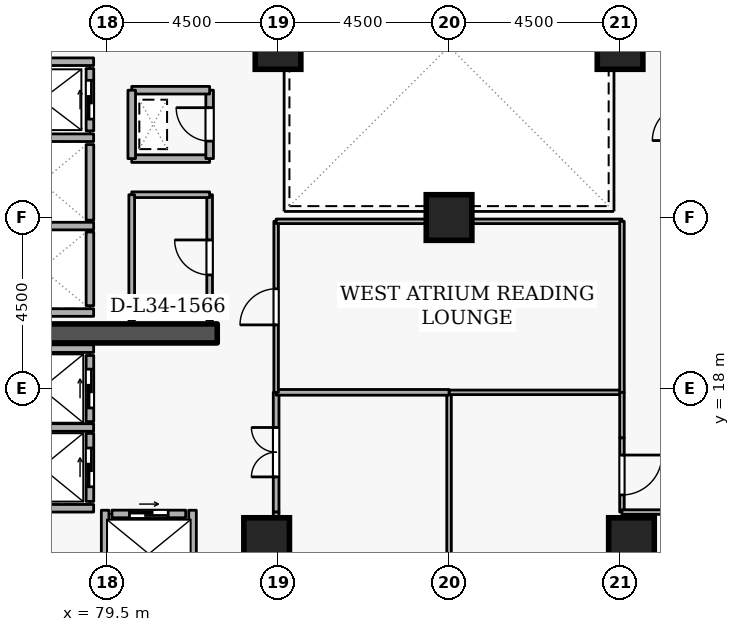
"""IFC4 building model, lengths in metres.
Left out: names, types, materials, properties, quantities, classifications, styles, units other than length and angle.
Written with IfcOpenShell. Run it as: python <this file> out.ifc"""

import sys

from ifc_helpers import new_model, si_unit, direction, frame, frame_2d, origin, origin_2d, place, context, subcontext, project, spatial, rectangle, extrude, element, fill, save


model = new_model("IFC4")
c1 = context("Model", 3, precision=1e-05, world=origin(), true_north=direction((0.0, 1.0)))
c2 = subcontext(c1, "Body", "Model", "MODEL_VIEW")
j1 = project(units=[si_unit("LENGTHUNIT", "METRE"), si_unit("PLANEANGLEUNIT", "RADIAN")], contexts=[c1])
p1 = place(None, origin())
s1 = spatial("IfcSite", under=j1, at=p1, CompositionType="ELEMENT")
p2 = place(p1, origin())
s2 = spatial("IfcBuilding", under=s1, at=p2, CompositionType="ELEMENT")
p3 = place(p2, frame((0.0, 0.0, 130.5)))
s3 = spatial("IfcBuildingStorey", under=s2, at=p3, CompositionType="ELEMENT", Elevation=130.5)
p4 = place(p3, frame((76.6, 19.45, 0.0), z_axis=(0.0, 0.0, 1.0), x_axis=(1.0, 0.0, 0.0)))
e1 = element("IfcWall", 1, at=p4, inside=s3, PredefinedType="SHEAR", context=c2, shape_type="SweptSolid", body=[
    extrude(rectangle(XDim=5.8, YDim=0.5, at=frame_2d((2.9, 0.0))), origin(), (0.0, 0.0, 1.0), 3.6),
])
for number, where, z_axis, x_axis in (
    (2, (93.3, 14.0, 0.0), (0.0, 0.0, 1.0), (1.0, 0.0, 0.0)),
    (3, (83.7, 14.0, 0.0), (0.0, 0.0, 1.0), (1.0, 0.0, 0.0)),
    (4, (93.0, 27.0, 0.0), (0.0, 0.0, 1.0), (1.0, 0.0, 0.0)),
    (5, (84.0, 27.0, 0.0), (0.0, 0.0, 1.0), (1.0, 0.0, 0.0)),
    (6, (88.5, 22.5, 0.0), (0.0, 0.0, 1.0), (1.0, 0.0, 0.0)),
):
    element("IfcColumn", number, at=place(p3, frame(where, z_axis=z_axis, x_axis=x_axis)), inside=s3, PredefinedType="COLUMN", context=c2, shape_type="SweptSolid", body=[
        extrude(rectangle(XDim=1.2, YDim=1.2, at=origin_2d()), origin(), (0.0, 0.0, 1.0), 3.6),
    ])
p5 = place(p3, frame((79.05, 24.78, 0.0), z_axis=(0.0, 0.0, 1.0), x_axis=(0.0, 1.0, 0.0)))
e7 = element("IfcWall", 7, at=p5, inside=s3, PredefinedType="STANDARD", context=c2, shape_type="SweptSolid", body=[
    extrude(rectangle(XDim=1.64, YDim=0.2, at=frame_2d((0.82, 0.0))), origin(), (0.0, 0.0, 1.0), 3.34),
])
p6 = place(p5, frame((0.31, 0.0, 0.0)))
e8 = element("IfcOpeningElement", 8, at=p6, cuts=e7, PredefinedType="OPENING", context=c2, shape_type="SweptSolid", body=[
    extrude(rectangle(XDim=1.02, YDim=2.06, at=frame_2d((0.51, 1.03))), frame((0.0, 0.11, 0.0), z_axis=(0.0, -1.0, 0.0), x_axis=(1.0, 0.0, 0.0)), (0.0, 0.0, 1.0), 0.22),
])
p7 = place(p3, frame((79.05, 22.43, 0.0), z_axis=(0.0, 0.0, 1.0), x_axis=(0.0, 1.0, 0.0)))
e9 = element("IfcWall", 9, at=p7, inside=s3, PredefinedType="STANDARD", context=c2, shape_type="SweptSolid", body=[
    extrude(rectangle(XDim=1.99, YDim=0.2, at=frame_2d((0.995, 0.0))), origin(), (0.0, 0.0, 1.0), 3.34),
])
p8 = place(p3, frame((79.05, 20.18, 0.0), z_axis=(0.0, 0.0, 1.0), x_axis=(0.0, 1.0, 0.0)))
e10 = element("IfcWall", 10, at=p8, inside=s3, PredefinedType="STANDARD", context=c2, shape_type="SweptSolid", body=[
    extrude(rectangle(XDim=1.94, YDim=0.2, at=frame_2d((0.97, 0.0))), origin(), (0.0, 0.0, 1.0), 3.34),
])
p9 = place(p3, frame((79.05, 17.13, 0.0), z_axis=(0.0, 0.0, 1.0), x_axis=(0.0, 1.0, 0.0)))
e11 = element("IfcWall", 11, at=p9, inside=s3, PredefinedType="STANDARD", context=c2, shape_type="SweptSolid", body=[
    extrude(rectangle(XDim=1.74, YDim=0.2, at=frame_2d((0.87, 0.0))), origin(), (0.0, 0.0, 1.0), 3.34),
])
p10 = place(p9, frame((0.36, 0.0, 0.0)))
e12 = element("IfcOpeningElement", 12, at=p10, cuts=e11, PredefinedType="OPENING", context=c2, shape_type="SweptSolid", body=[
    extrude(rectangle(XDim=1.02, YDim=2.06, at=frame_2d((0.51, 1.03))), frame((0.0, 0.11, 0.0), z_axis=(0.0, -1.0, 0.0), x_axis=(1.0, 0.0, 0.0)), (0.0, 0.0, 1.0), 0.22),
])
p11 = place(p3, frame((79.05, 15.03, 0.0), z_axis=(0.0, 0.0, 1.0), x_axis=(0.0, 1.0, 0.0)))
e13 = element("IfcWall", 13, at=p11, inside=s3, PredefinedType="STANDARD", context=c2, shape_type="SweptSolid", body=[
    extrude(rectangle(XDim=1.79, YDim=0.2, at=frame_2d((0.895, 0.0))), origin(), (0.0, 0.0, 1.0), 3.34),
])
p12 = place(p11, frame((0.385, 0.0, 0.0)))
e14 = element("IfcOpeningElement", 14, at=p12, cuts=e13, PredefinedType="OPENING", context=c2, shape_type="SweptSolid", body=[
    extrude(rectangle(XDim=1.02, YDim=2.06, at=frame_2d((0.51, 1.03))), frame((0.0, 0.11, 0.0), z_axis=(0.0, -1.0, 0.0), x_axis=(1.0, 0.0, 0.0)), (0.0, 0.0, 1.0), 0.22),
])
p13 = place(p3, frame((79.63, 14.7, 0.0), z_axis=(0.0, 0.0, 1.0), x_axis=(1.0, 0.0, 0.0)))
e15 = element("IfcWall", 15, at=p13, inside=s3, PredefinedType="STANDARD", context=c2, shape_type="SweptSolid", body=[
    extrude(rectangle(XDim=1.94, YDim=0.2, at=frame_2d((0.97, 0.0))), origin(), (0.0, 0.0, 1.0), 3.34),
])
p14 = place(p13, frame((0.46, 0.0, 0.0)))
e16 = element("IfcOpeningElement", 16, at=p14, cuts=e15, PredefinedType="OPENING", context=c2, shape_type="SweptSolid", body=[
    extrude(rectangle(XDim=1.02, YDim=2.06, at=frame_2d((0.51, 1.03))), frame((0.0, 0.11, 0.0), z_axis=(0.0, -1.0, 0.0), x_axis=(1.0, 0.0, 0.0)), (0.0, 0.0, 1.0), 0.22),
])
for number, where, z_axis, x_axis in (
    (17, (76.612, 26.6, 0.0), (0.0, 0.0, 1.0), (1.0, 0.0, 0.0)),
    (18, (76.612, 24.6, 0.0), (0.0, 0.0, 1.0), (1.0, 0.0, 0.0)),
    (19, (76.612, 22.275, 0.0), (0.0, 0.0, 1.0), (1.0, 0.0, 0.0)),
    (20, (76.612, 20.0, 0.0), (0.0, 0.0, 1.0), (1.0, 0.0, 0.0)),
):
    element("IfcWall", number, at=place(p3, frame(where, z_axis=z_axis, x_axis=x_axis)), inside=s3, PredefinedType="STANDARD", context=c2, shape_type="SweptSolid", body=[
        extrude(rectangle(XDim=2.536, YDim=0.2, at=frame_2d((1.268, 0.0))), origin(), (0.0, 0.0, 1.0), 3.34),
    ])
p15 = place(p3, frame((76.402, 19.05, 0.0), z_axis=(0.0, 0.0, 1.0), x_axis=(1.0, 0.0, 0.0)))
e21 = element("IfcWall", 21, at=p15, inside=s3, PredefinedType="STANDARD", context=c2, shape_type="SweptSolid", body=[
    extrude(rectangle(XDim=2.746, YDim=0.2, at=frame_2d((1.373, 0.0))), origin(), (0.0, 0.0, 1.0), 2.545),
])
p16 = place(p3, frame((76.402, 16.975, 0.0), z_axis=(0.0, 0.0, 1.0), x_axis=(1.0, 0.0, 0.0)))
e22 = element("IfcWall", 22, at=p16, inside=s3, PredefinedType="STANDARD", context=c2, shape_type="SweptSolid", body=[
    extrude(rectangle(XDim=2.746, YDim=0.2, at=frame_2d((1.373, 0.0))), origin(), (0.0, 0.0, 1.0), 3.34),
])
p17 = place(p3, frame((76.512, 14.85, 0.0), z_axis=(0.0, 0.0, 1.0), x_axis=(1.0, 0.0, 0.0)))
e23 = element("IfcWall", 23, at=p17, inside=s3, PredefinedType="STANDARD", context=c2, shape_type="SweptSolid", body=[
    extrude(rectangle(XDim=2.636, YDim=0.2, at=frame_2d((1.318, 0.0))), origin(), (0.0, 0.0, 1.0), 3.34),
])
for number, where, z_axis, x_axis in (
    (24, (81.75, 12.612, 0.0), (0.0, 0.0, 1.0), (0.0, 1.0, 0.0)),
    (25, (79.45, 12.612, 0.0), (0.0, 0.0, 1.0), (0.0, 1.0, 0.0)),
):
    element("IfcWall", number, at=place(p3, frame(where, z_axis=z_axis, x_axis=x_axis)), inside=s3, PredefinedType="STANDARD", context=c2, shape_type="SweptSolid", body=[
        extrude(rectangle(XDim=2.186, YDim=0.2, at=frame_2d((1.093, 0.0))), origin(), (0.0, 0.0, 1.0), 3.34),
    ])
p18 = place(p3, frame((80.15, 24.05, 0.0), z_axis=(0.0, 0.0, 1.0), x_axis=(1.0, 0.0, 0.0)))
e26 = element("IfcWall", 26, at=p18, inside=s3, PredefinedType="STANDARD", context=c2, shape_type="SweptSolid", body=[
    extrude(rectangle(XDim=2.05, YDim=0.2, at=frame_2d((1.025, 0.0))), origin(), (0.0, 0.0, 1.0), 3.34),
])
p19 = place(p3, frame((82.2, 24.05, 0.0), z_axis=(0.0, 0.0, 1.0), x_axis=(0.0, 1.0, 0.0)))
e27 = element("IfcWall", 27, at=p19, inside=s3, PredefinedType="STANDARD", context=c2, shape_type="SweptSolid", body=[
    extrude(rectangle(XDim=1.8, YDim=0.2, at=frame_2d((0.9, 0.0))), origin(), (0.0, 0.0, 1.0), 3.34),
])
p20 = place(p19, frame((0.46, 0.0, 0.0)))
e28 = element("IfcOpeningElement", 28, at=p20, cuts=e27, PredefinedType="OPENING", context=c2, shape_type="SweptSolid", body=[
    extrude(rectangle(XDim=0.88, YDim=2.04, at=frame_2d((0.44, 1.02))), frame((0.0, 0.11, 0.0), z_axis=(0.0, -1.0, 0.0), x_axis=(1.0, 0.0, 0.0)), (0.0, 0.0, 1.0), 0.22),
])
p21 = place(p3, frame((82.2, 25.85, 0.0), z_axis=(0.0, 0.0, 1.0), x_axis=(-1.0, 0.0, 0.0)))
e29 = element("IfcWall", 29, at=p21, inside=s3, PredefinedType="STANDARD", context=c2, shape_type="SweptSolid", body=[
    extrude(rectangle(XDim=2.05, YDim=0.2, at=frame_2d((1.025, 0.0))), origin(), (0.0, 0.0, 1.0), 3.34),
])
p22 = place(p3, frame((80.15, 25.85, 0.0), z_axis=(0.0, 0.0, 1.0), x_axis=(0.0, -1.0, 0.0)))
e30 = element("IfcWall", 30, at=p22, inside=s3, PredefinedType="STANDARD", context=c2, shape_type="SweptSolid", body=[
    extrude(rectangle(XDim=1.8, YDim=0.2, at=frame_2d((0.9, 0.0))), origin(), (0.0, 0.0, 1.0), 3.34),
])
p23 = place(p3, frame((82.2, 19.8, 0.0), z_axis=(0.0, 0.0, 1.0), x_axis=(0.0, 1.0, 0.0)))
e31 = element("IfcWall", 31, at=p23, inside=s3, PredefinedType="PARTITIONING", context=c2, shape_type="SweptSolid", body=[
    extrude(rectangle(XDim=3.3, YDim=0.15, at=frame_2d((1.65, 0.0))), origin(), (0.0, 0.0, 1.0), 3.34),
])
p24 = place(p23, frame((1.19, 0.0, 0.0)))
e32 = element("IfcOpeningElement", 32, at=p24, cuts=e31, PredefinedType="OPENING", context=c2, shape_type="SweptSolid", body=[
    extrude(rectangle(XDim=0.92, YDim=2.08, at=frame_2d((0.46, 1.04))), frame((0.0, 0.085, 0.0), z_axis=(0.0, -1.0, 0.0), x_axis=(1.0, 0.0, 0.0)), (0.0, 0.0, 1.0), 0.17),
])
p25 = place(p3, frame((82.2, 23.1, 0.0), z_axis=(0.0, 0.0, 1.0), x_axis=(-1.0, 0.0, 0.0)))
e33 = element("IfcWall", 33, at=p25, inside=s3, PredefinedType="PARTITIONING", context=c2, shape_type="SweptSolid", body=[
    extrude(rectangle(XDim=2.05, YDim=0.15, at=frame_2d((1.025, 0.0))), origin(), (0.0, 0.0, 1.0), 3.34),
])
p26 = place(p3, frame((80.15, 23.1, 0.0), z_axis=(0.0, 0.0, 1.0), x_axis=(0.0, -1.0, 0.0)))
e34 = element("IfcWall", 34, at=p26, inside=s3, PredefinedType="PARTITIONING", context=c2, shape_type="SweptSolid", body=[
    extrude(rectangle(XDim=3.3, YDim=0.15, at=frame_2d((1.65, 0.0))), origin(), (0.0, 0.0, 1.0), 3.34),
])
p27 = place(p3, frame((88.5, 3.28, 0.0), z_axis=(0.0, 0.0, 1.0), x_axis=(0.0, 1.0, 0.0)))
e35 = element("IfcWall", 35, at=p27, inside=s3, PredefinedType="PARTITIONING", context=c2, shape_type="SweptSolid", body=[
    extrude(rectangle(XDim=14.62, YDim=0.12, at=frame_2d((7.31, 0.0))), origin(), (0.0, 0.0, 1.0), 2.878),
])
p28 = place(p3, frame((88.5, 17.9, 0.0), z_axis=(0.0, 0.0, 1.0), x_axis=(1.0, 0.0, 0.0)))
e36 = element("IfcWall", 36, at=p28, inside=s3, PredefinedType="PARTITIONING", context=c2, shape_type="SweptSolid", body=[
    extrude(rectangle(XDim=4.55, YDim=0.12, at=frame_2d((2.275, 0.0))), origin(), (0.0, 0.0, 1.0), 3.34),
])
p29 = place(p3, frame((93.05, 17.9, 0.0), z_axis=(0.0, 0.0, 1.0), x_axis=(0.0, -1.0, 0.0)))
e37 = element("IfcWall", 37, at=p29, inside=s3, PredefinedType="PARTITIONING", context=c2, shape_type="SweptSolid", body=[
    extrude(rectangle(XDim=1.2, YDim=0.12, at=frame_2d((0.6, 0.0))), origin(), (0.0, 0.0, 1.0), 3.34),
])
p30 = place(p3, frame((93.05, 16.7, 0.0), z_axis=(0.0, 0.0, 1.0), x_axis=(0.0, -1.0, 0.0)))
e38 = element("IfcWall", 38, at=p30, inside=s3, PredefinedType="PARTITIONING", context=c2, shape_type="SweptSolid", body=[
    extrude(rectangle(XDim=1.95, YDim=0.12, at=frame_2d((0.975, 0.0))), origin(), (0.0, 0.0, 1.0), 3.34),
])
p31 = place(p30, frame((0.45, 0.0, 0.0)))
e39 = element("IfcOpeningElement", 39, at=p31, cuts=e38, PredefinedType="OPENING", context=c2, shape_type="SweptSolid", body=[
    extrude(rectangle(XDim=1.05, YDim=2.1, at=frame_2d((0.525, 1.05))), frame((0.0, 0.07, 0.0), z_axis=(0.0, -1.0, 0.0), x_axis=(1.0, 0.0, 0.0)), (0.0, 0.0, 1.0), 0.14),
])
p32 = place(p3, frame((93.05, 14.75, 0.0), z_axis=(0.0, 0.0, 1.0), x_axis=(1.0, 0.0, 0.0)))
e40 = element("IfcWall", 40, at=p32, inside=s3, PredefinedType="PARTITIONING", context=c2, shape_type="SweptSolid", body=[
    extrude(rectangle(XDim=1.75, YDim=0.12, at=frame_2d((0.875, 0.0))), origin(), (0.0, 0.0, 1.0), 3.34),
])
p33 = place(p3, frame((83.95, 14.75, 0.0), z_axis=(0.0, 0.0, 1.0), x_axis=(0.0, 1.0, 0.0)))
e41 = element("IfcWall", 41, at=p33, inside=s3, PredefinedType="PARTITIONING", context=c2, shape_type="SweptSolid", body=[
    extrude(rectangle(XDim=3.15, YDim=0.15, at=frame_2d((1.575, 0.0))), origin(), (0.0, 0.0, 1.0), 3.34),
])
p34 = place(p33, frame((0.925, 0.0, 0.0)))
e42 = element("IfcOpeningElement", 42, at=p34, cuts=e41, PredefinedType="OPENING", context=c2, shape_type="SweptSolid", body=[
    extrude(rectangle(XDim=1.3, YDim=2.12, at=frame_2d((0.65, 1.06))), frame((0.0, 0.085, 0.0), z_axis=(0.0, -1.0, 0.0), x_axis=(1.0, 0.0, 0.0)), (0.0, 0.0, 1.0), 0.17),
])
p35 = place(p3, frame((83.95, 17.9, 0.0), z_axis=(0.0, 0.0, 1.0), x_axis=(1.0, 0.0, 0.0)))
e43 = element("IfcWall", 43, at=p35, inside=s3, PredefinedType="PARTITIONING", context=c2, shape_type="SweptSolid", body=[
    extrude(rectangle(XDim=4.55, YDim=0.15, at=frame_2d((2.275, 0.0))), origin(), (0.0, 0.0, 1.0), 3.34),
])
p36 = place(p3, frame((83.95, 12.4, 0.0), z_axis=(0.0, 0.0, 1.0), x_axis=(0.0, 1.0, 0.0)))
e44 = element("IfcWall", 44, at=p36, inside=s3, PredefinedType="PARTITIONING", context=c2, shape_type="SweptSolid", body=[
    extrude(rectangle(XDim=2.35, YDim=0.15, at=frame_2d((1.175, 0.0))), origin(), (0.0, 0.0, 1.0), 3.34),
])
p37 = place(p3, frame((83.95, 17.9, 0.0), z_axis=(0.0, 0.0, 1.0), x_axis=(0.0, 1.0, 0.0)))
e45 = element("IfcWall", 45, at=p37, inside=s3, PredefinedType="PARTITIONING", context=c2, shape_type="SweptSolid", body=[
    extrude(rectangle(XDim=4.5, YDim=0.12, at=frame_2d((2.25, 0.0))), origin(), (0.0, 0.0, 1.0), 3.34),
])
p38 = place(p37, frame((1.775, 0.0, 0.0)))
e46 = element("IfcOpeningElement", 46, at=p38, cuts=e45, PredefinedType="OPENING", context=c2, shape_type="SweptSolid", body=[
    extrude(rectangle(XDim=0.95, YDim=2.1, at=frame_2d((0.475, 1.05))), frame((0.0, 0.07, 0.0), z_axis=(0.0, -1.0, 0.0), x_axis=(1.0, 0.0, 0.0)), (0.0, 0.0, 1.0), 0.14),
])
p39 = place(p3, frame((83.95, 22.4, 0.0), z_axis=(0.0, 0.0, 1.0), x_axis=(1.0, 0.0, 0.0)))
e47 = element("IfcWall", 47, at=p39, inside=s3, PredefinedType="PARTITIONING", context=c2, shape_type="SweptSolid", body=[
    extrude(rectangle(XDim=9.1, YDim=0.12, at=frame_2d((4.55, 0.0))), origin(), (0.0, 0.0, 1.0), 3.34),
])
p40 = place(p3, frame((93.05, 22.4, 0.0), z_axis=(0.0, 0.0, 1.0), x_axis=(0.0, -1.0, 0.0)))
e48 = element("IfcWall", 48, at=p40, inside=s3, PredefinedType="PARTITIONING", context=c2, shape_type="SweptSolid", body=[
    extrude(rectangle(XDim=4.5, YDim=0.12, at=frame_2d((2.25, 0.0))), origin(), (0.0, 0.0, 1.0), 3.34),
])
p41 = place(p6, origin())
e49 = element("IfcDoor", 49, at=p41, inside=s3, OperationType="SLIDING_TO_LEFT", PredefinedType="DOOR", context=c2, shape_type="SweptSolid", body=[
    extrude(rectangle(XDim=1.02, YDim=2.06, at=frame_2d((0.51, 1.03))), frame((0.0, 0.025, 0.0), z_axis=(0.0, -1.0, 0.0), x_axis=(1.0, 0.0, 0.0)), (0.0, 0.0, 1.0), 0.05),
])
fill(e8, e49)
p42 = place(p10, origin())
e50 = element("IfcDoor", 50, at=p42, inside=s3, OperationType="SLIDING_TO_LEFT", PredefinedType="DOOR", context=c2, shape_type="SweptSolid", body=[
    extrude(rectangle(XDim=1.02, YDim=2.06, at=frame_2d((0.51, 1.03))), frame((0.0, 0.025, 0.0), z_axis=(0.0, -1.0, 0.0), x_axis=(1.0, 0.0, 0.0)), (0.0, 0.0, 1.0), 0.05),
])
fill(e12, e50)
p43 = place(p12, origin())
e51 = element("IfcDoor", 51, at=p43, inside=s3, OperationType="SLIDING_TO_LEFT", PredefinedType="DOOR", context=c2, shape_type="SweptSolid", body=[
    extrude(rectangle(XDim=1.02, YDim=2.06, at=frame_2d((0.51, 1.03))), frame((0.0, 0.025, 0.0), z_axis=(0.0, -1.0, 0.0), x_axis=(1.0, 0.0, 0.0)), (0.0, 0.0, 1.0), 0.05),
])
fill(e14, e51)
p44 = place(p14, origin())
e52 = element("IfcDoor", 52, at=p44, inside=s3, OperationType="SLIDING_TO_LEFT", PredefinedType="DOOR", context=c2, shape_type="SweptSolid", body=[
    extrude(rectangle(XDim=1.02, YDim=2.06, at=frame_2d((0.51, 1.03))), frame((0.0, 0.025, 0.0), z_axis=(0.0, -1.0, 0.0), x_axis=(1.0, 0.0, 0.0)), (0.0, 0.0, 1.0), 0.05),
])
fill(e16, e52)
p45 = place(p20, origin())
e53 = element("IfcDoor", 53, at=p45, inside=s3, OperationType="SINGLE_SWING_RIGHT", PredefinedType="DOOR", context=c2, shape_type="SweptSolid", body=[
    extrude(rectangle(XDim=0.88, YDim=2.04, at=frame_2d((0.44, 1.02))), frame((0.0, 0.025, 0.0), z_axis=(0.0, -1.0, 0.0), x_axis=(1.0, 0.0, 0.0)), (0.0, 0.0, 1.0), 0.05),
])
fill(e28, e53)
p46 = place(p24, origin())
e54 = element("IfcDoor", 54, at=p46, inside=s3, OperationType="SINGLE_SWING_RIGHT", PredefinedType="DOOR", context=c2, shape_type="SweptSolid", body=[
    extrude(rectangle(XDim=0.92, YDim=2.08, at=frame_2d((0.46, 1.04))), frame((0.0, 0.025, 0.0), z_axis=(0.0, -1.0, 0.0), x_axis=(1.0, 0.0, 0.0)), (0.0, 0.0, 1.0), 0.05),
])
fill(e32, e54)
p47 = place(p31, origin())
e55 = element("IfcDoor", 55, at=p47, inside=s3, OperationType="SINGLE_SWING_LEFT", PredefinedType="DOOR", context=c2, shape_type="SweptSolid", body=[
    extrude(rectangle(XDim=1.05, YDim=2.1, at=frame_2d((0.525, 1.05))), frame((0.0, 0.025, 0.0), z_axis=(0.0, -1.0, 0.0), x_axis=(1.0, 0.0, 0.0)), (0.0, 0.0, 1.0), 0.05),
])
fill(e39, e55)
p48 = place(p34, origin())
e56 = element("IfcDoor", 56, at=p48, inside=s3, OperationType="DOUBLE_DOOR_SINGLE_SWING", PredefinedType="DOOR", context=c2, shape_type="SweptSolid", body=[
    extrude(rectangle(XDim=1.3, YDim=2.12, at=frame_2d((0.65, 1.06))), frame((0.0, 0.025, 0.0), z_axis=(0.0, -1.0, 0.0), x_axis=(1.0, 0.0, 0.0)), (0.0, 0.0, 1.0), 0.05),
])
fill(e42, e56)
p49 = place(p38, origin())
e57 = element("IfcDoor", 57, at=p49, inside=s3, OperationType="SINGLE_SWING_LEFT", PredefinedType="DOOR", context=c2, shape_type="SweptSolid", body=[
    extrude(rectangle(XDim=0.95, YDim=2.1, at=frame_2d((0.475, 1.05))), frame((0.0, 0.025, 0.0), z_axis=(0.0, -1.0, 0.0), x_axis=(1.0, 0.0, 0.0)), (0.0, 0.0, 1.0), 0.05),
])
fill(e46, e57)
save(model, sys.argv[1])
